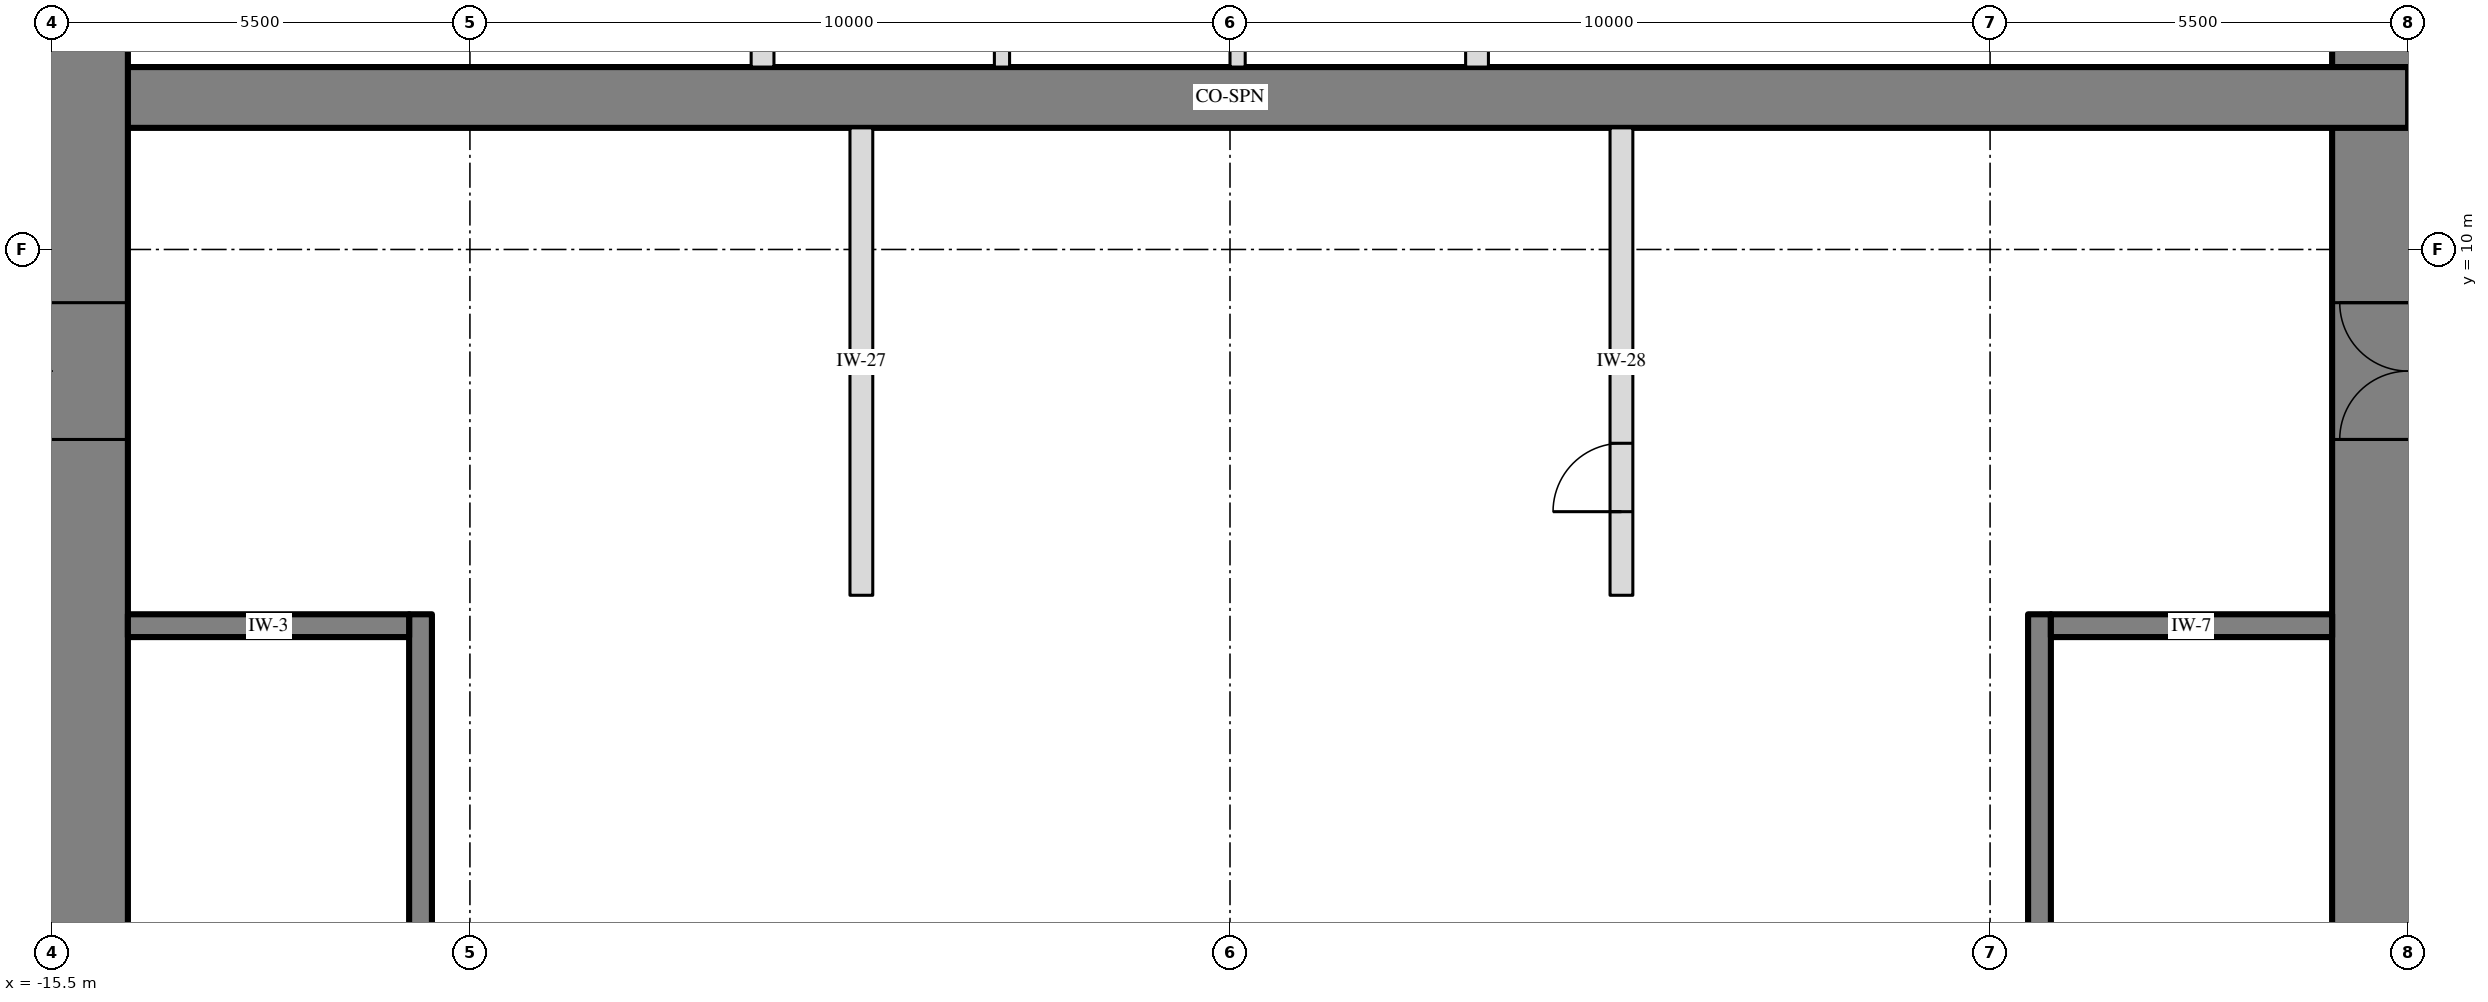
"""IFC4 building model, lengths in metres.
Left out: names, types, materials, properties, quantities, classifications, styles, units other than length and angle.
Written with IfcOpenShell. Run it as: python <this file> out.ifc"""

import sys

from ifc_helpers import new_model, si_unit, direction, frame, frame_2d, origin, origin_2d, place, context, subcontext, project, spatial, rectangle, extrude, element, fill, save


model = new_model("IFC4")
c1 = context("Model", 3, precision=1e-05, world=origin(), true_north=direction((0.0, 1.0)))
c2 = subcontext(c1, "Body", "Model", "MODEL_VIEW")
j1 = project(units=[si_unit("LENGTHUNIT", "METRE"), si_unit("PLANEANGLEUNIT", "RADIAN")], contexts=[c1])
p1 = place(None, origin())
s1 = spatial("IfcSite", under=j1, at=p1, CompositionType="ELEMENT")
p2 = place(p1, origin())
s2 = spatial("IfcBuilding", under=s1, at=p2, CompositionType="ELEMENT")
p3 = place(p2, frame((0.0, 0.0, -13.2)))
s3 = spatial("IfcBuildingStorey", under=s2, at=p3, CompositionType="ELEMENT", Elevation=-13.2)
p4 = place(p3, frame((15.5, -15.5, -0.4), z_axis=(0.0, 0.0, 1.0), x_axis=(0.0, 1.0, 0.0)))
e1 = element("IfcWall", 1, at=p4, inside=s3, PredefinedType="SHEAR", context=c2, shape_type="SweptSolid", body=[
    extrude(rectangle(XDim=31.0, YDim=2.0, at=frame_2d((15.5, 0.0))), origin(), (0.0, 0.0, 1.0), 4.3),
])
p5 = place(p4, frame((6.5, 0.0, 0.4)))
e2 = element("IfcOpeningElement", 2, at=p5, cuts=e1, PredefinedType="OPENING", context=c2, shape_type="SweptSolid", body=[
    extrude(rectangle(XDim=1.2, YDim=2.1, at=frame_2d((0.6, 1.05))), frame((0.0, 1.01, 0.0), z_axis=(0.0, -1.0, 0.0), x_axis=(1.0, 0.0, 0.0)), (0.0, 0.0, 1.0), 2.02),
])
p6 = place(p4, frame((23.0, 0.0, 0.4)))
e3 = element("IfcOpeningElement", 3, at=p6, cuts=e1, PredefinedType="OPENING", context=c2, shape_type="SweptSolid", body=[
    extrude(rectangle(XDim=1.8, YDim=2.1, at=frame_2d((0.9, 1.05))), frame((0.0, 1.01, 0.0), z_axis=(0.0, -1.0, 0.0), x_axis=(1.0, 0.0, 0.0)), (0.0, 0.0, 1.0), 2.02),
])
p7 = place(p3, frame((-15.5, 12.0, -0.4), z_axis=(0.0, 0.0, 1.0), x_axis=(1.0, 0.0, 0.0)))
e4 = element("IfcWall", 4, at=p7, inside=s3, PredefinedType="SHEAR", context=c2, shape_type="SweptSolid", body=[
    extrude(rectangle(XDim=31.0, YDim=0.8, at=frame_2d((15.5, 0.0))), origin(), (0.0, 0.0, 1.0), 4.3),
])
p8 = place(p3, frame((-15.5, -15.5, -0.4), z_axis=(0.0, 0.0, 1.0), x_axis=(0.0, 1.0, 0.0)))
e5 = element("IfcWall", 5, at=p8, inside=s3, PredefinedType="SHEAR", context=c2, shape_type="SweptSolid", body=[
    extrude(rectangle(XDim=31.0, YDim=2.0, at=frame_2d((15.5, 0.0))), origin(), (0.0, 0.0, 1.0), 4.3),
])
p9 = place(p8, frame((6.5, 0.0, 0.4)))
e6 = element("IfcOpeningElement", 6, at=p9, cuts=e5, PredefinedType="OPENING", context=c2, shape_type="SweptSolid", body=[
    extrude(rectangle(XDim=1.2, YDim=2.1, at=frame_2d((0.6, 1.05))), frame((0.0, 1.01, 0.0), z_axis=(0.0, -1.0, 0.0), x_axis=(1.0, 0.0, 0.0)), (0.0, 0.0, 1.0), 2.02),
])
p10 = place(p8, frame((23.0, 0.0, 0.4)))
e7 = element("IfcOpeningElement", 7, at=p10, cuts=e5, PredefinedType="OPENING", context=c2, shape_type="SweptSolid", body=[
    extrude(rectangle(XDim=1.8, YDim=2.1, at=frame_2d((0.9, 1.05))), frame((0.0, 1.01, 0.0), z_axis=(0.0, -1.0, 0.0), x_axis=(1.0, 0.0, 0.0)), (0.0, 0.0, 1.0), 2.02),
])
p11 = place(p3, frame((-10.65, -4.9, 0.0), z_axis=(0.0, 0.0, 1.0), x_axis=(0.0, 1.0, 0.0)))
e8 = element("IfcWall", 8, at=p11, inside=s3, PredefinedType="SOLIDWALL", context=c2, shape_type="SweptSolid", body=[
    extrude(rectangle(XDim=10.1, YDim=0.3, at=frame_2d((5.05, 0.0))), origin(), (0.0, 0.0, 1.0), 3.9),
])
p12 = place(p3, frame((-14.5, 5.05, 0.0), z_axis=(0.0, 0.0, 1.0), x_axis=(1.0, 0.0, 0.0)))
e9 = element("IfcWall", 9, at=p12, inside=s3, PredefinedType="SOLIDWALL", context=c2, shape_type="SweptSolid", body=[
    extrude(rectangle(XDim=3.7, YDim=0.3, at=frame_2d((1.85, 0.0))), origin(), (0.0, 0.0, 1.0), 3.9),
])
p13 = place(p3, frame((10.65, -4.9, 0.0), z_axis=(0.0, 0.0, 1.0), x_axis=(0.0, 1.0, 0.0)))
e10 = element("IfcWall", 10, at=p13, inside=s3, PredefinedType="SOLIDWALL", context=c2, shape_type="SweptSolid", body=[
    extrude(rectangle(XDim=10.1, YDim=0.3, at=frame_2d((5.05, 0.0))), origin(), (0.0, 0.0, 1.0), 3.9),
])
p14 = place(p3, frame((14.5, 5.05, 0.0), z_axis=(0.0, 0.0, 1.0), x_axis=(-1.0, 0.0, 0.0)))
e11 = element("IfcWall", 11, at=p14, inside=s3, PredefinedType="SOLIDWALL", context=c2, shape_type="SweptSolid", body=[
    extrude(rectangle(XDim=3.7, YDim=0.3, at=frame_2d((1.85, 0.0))), origin(), (0.0, 0.0, 1.0), 3.9),
])
for number, where, z_axis, x_axis in (
    (12, (-6.15, 12.4, 0.0), (0.0, 0.0, 1.0), (0.0, 1.0, 0.0)),
    (13, (3.25, 12.4, 0.0), (0.0, 0.0, 1.0), (0.0, 1.0, 0.0)),
):
    element("IfcWall", number, at=place(p3, frame(where, z_axis=z_axis, x_axis=x_axis)), inside=s3, PredefinedType="PARTITIONING", context=c2, shape_type="SweptSolid", body=[
        extrude(rectangle(XDim=2.1, YDim=0.3, at=frame_2d((1.05, 0.0))), origin(), (0.0, 0.0, 1.0), 3.9),
    ])
for number, where, z_axis, x_axis in (
    (14, (-3.0, 12.4, 0.0), (0.0, 0.0, 1.0), (0.0, 1.0, 0.0)),
    (15, (0.1, 12.4, 0.0), (0.0, 0.0, 1.0), (0.0, 1.0, 0.0)),
):
    element("IfcWall", number, at=place(p3, frame(where, z_axis=z_axis, x_axis=x_axis)), inside=s3, PredefinedType="PARTITIONING", context=c2, shape_type="SweptSolid", body=[
        extrude(rectangle(XDim=2.1, YDim=0.2, at=frame_2d((1.05, 0.0))), origin(), (0.0, 0.0, 1.0), 3.9),
    ])
p15 = place(p3, frame((-10.65, 2.0, 0.0), z_axis=(0.0, 0.0, 1.0), x_axis=(1.0, 0.0, 0.0)))
e16 = element("IfcWall", 16, at=p15, inside=s3, PredefinedType="PARTITIONING", context=c2, shape_type="SweptSolid", body=[
    extrude(rectangle(XDim=21.3, YDim=0.3, at=frame_2d((10.65, 0.0))), origin(), (0.0, 0.0, 1.0), 3.9),
])
p16 = place(p15, frame((10.05, 0.0, 0.0)))
e17 = element("IfcOpeningElement", 17, at=p16, cuts=e16, PredefinedType="OPENING", context=c2, shape_type="SweptSolid", body=[
    extrude(rectangle(XDim=1.2, YDim=2.1, at=frame_2d((0.6, 1.05))), frame((0.0, 0.16, 0.0), z_axis=(0.0, -1.0, 0.0), x_axis=(1.0, 0.0, 0.0)), (0.0, 0.0, 1.0), 0.32),
])
p17 = place(p15, frame((18.942, 0.0, 0.0)))
e18 = element("IfcOpeningElement", 18, at=p17, cuts=e16, PredefinedType="OPENING", context=c2, shape_type="SweptSolid", body=[
    extrude(rectangle(XDim=0.9, YDim=2.1, at=frame_2d((0.45, 1.05))), frame((0.0, 0.16, 0.0), z_axis=(0.0, -1.0, 0.0), x_axis=(1.0, 0.0, 0.0)), (0.0, 0.0, 1.0), 0.32),
])
p18 = place(p3, frame((-3.3, -6.65, 0.0), z_axis=(0.0, 0.0, 1.0), x_axis=(0.0, 1.0, 0.0)))
e19 = element("IfcWall", 19, at=p18, inside=s3, PredefinedType="PARTITIONING", context=c2, shape_type="SweptSolid", body=[
    extrude(rectangle(XDim=8.65, YDim=0.3, at=frame_2d((4.325, 0.0))), origin(), (0.0, 0.0, 1.0), 3.9),
])
p19 = place(p18, frame((1.75, 0.0, 0.0)))
e20 = element("IfcOpeningElement", 20, at=p19, cuts=e19, PredefinedType="OPENING", context=c2, shape_type="SweptSolid", body=[
    extrude(rectangle(XDim=0.9, YDim=2.1, at=frame_2d((0.45, 1.05))), frame((0.0, 0.16, 0.0), z_axis=(0.0, -1.0, 0.0), x_axis=(1.0, 0.0, 0.0)), (0.0, 0.0, 1.0), 0.32),
])
p20 = place(p18, frame((6.075, 0.0, 0.0)))
e21 = element("IfcOpeningElement", 21, at=p20, cuts=e19, PredefinedType="OPENING", context=c2, shape_type="SweptSolid", body=[
    extrude(rectangle(XDim=0.9, YDim=2.1, at=frame_2d((0.45, 1.05))), frame((0.0, 0.16, 0.0), z_axis=(0.0, -1.0, 0.0), x_axis=(1.0, 0.0, 0.0)), (0.0, 0.0, 1.0), 0.32),
])
p21 = place(p3, frame((3.3, -6.65, 0.0), z_axis=(0.0, 0.0, 1.0), x_axis=(0.0, 1.0, 0.0)))
e22 = element("IfcWall", 22, at=p21, inside=s3, PredefinedType="PARTITIONING", context=c2, shape_type="SweptSolid", body=[
    extrude(rectangle(XDim=8.65, YDim=0.3, at=frame_2d((4.325, 0.0))), origin(), (0.0, 0.0, 1.0), 3.9),
])
p22 = place(p21, frame((3.875, 0.0, 0.0)))
e23 = element("IfcOpeningElement", 23, at=p22, cuts=e22, PredefinedType="OPENING", context=c2, shape_type="SweptSolid", body=[
    extrude(rectangle(XDim=0.9, YDim=2.1, at=frame_2d((0.45, 1.05))), frame((0.0, 0.16, 0.0), z_axis=(0.0, -1.0, 0.0), x_axis=(1.0, 0.0, 0.0)), (0.0, 0.0, 1.0), 0.32),
])
p23 = place(p3, frame((6.834, -6.65, 0.0), z_axis=(0.0, 0.0, 1.0), x_axis=(0.0, 1.0, 0.0)))
e24 = element("IfcWall", 24, at=p23, inside=s3, PredefinedType="PARTITIONING", context=c2, shape_type="SweptSolid", body=[
    extrude(rectangle(XDim=8.65, YDim=0.3, at=frame_2d((4.325, 0.0))), origin(), (0.0, 0.0, 1.0), 3.9),
])
p24 = place(p3, frame((-4.85, 5.45, 0.0), z_axis=(0.0, 0.0, 1.0), x_axis=(1.0, 0.0, 0.0)))
e25 = element("IfcWall", 25, at=p24, inside=s3, PredefinedType="PARTITIONING", context=c2, shape_type="SweptSolid", body=[
    extrude(rectangle(XDim=10.0, YDim=0.3, at=frame_2d((5.0, 0.0))), origin(), (0.0, 0.0, 1.0), 3.9),
])
p25 = place(p3, frame((-4.85, 5.45, 0.0), z_axis=(0.0, 0.0, 1.0), x_axis=(0.0, 1.0, 0.0)))
e26 = element("IfcWall", 26, at=p25, inside=s3, PredefinedType="PARTITIONING", context=c2, shape_type="SweptSolid", body=[
    extrude(rectangle(XDim=6.15, YDim=0.3, at=frame_2d((3.075, 0.0))), origin(), (0.0, 0.0, 1.0), 3.9),
])
p26 = place(p3, frame((5.15, 5.45, 0.0), z_axis=(0.0, 0.0, 1.0), x_axis=(0.0, 1.0, 0.0)))
e27 = element("IfcWall", 27, at=p26, inside=s3, PredefinedType="PARTITIONING", context=c2, shape_type="SweptSolid", body=[
    extrude(rectangle(XDim=6.15, YDim=0.3, at=frame_2d((3.075, 0.0))), origin(), (0.0, 0.0, 1.0), 3.9),
])
p27 = place(p26, frame((1.1, 0.0, 0.0)))
e28 = element("IfcOpeningElement", 28, at=p27, cuts=e27, PredefinedType="OPENING", context=c2, shape_type="SweptSolid", body=[
    extrude(rectangle(XDim=0.9, YDim=2.1, at=frame_2d((0.45, 1.05))), frame((0.0, 0.16, 0.0), z_axis=(0.0, -1.0, 0.0), x_axis=(1.0, 0.0, 0.0)), (0.0, 0.0, 1.0), 0.32),
])
for number, where, z_axis, x_axis in (
    (29, (-4.55, 5.45, 0.0), (0.0, 0.0, 1.0), (1.0, 0.0, 0.0)),
    (30, (4.85, 5.45, 0.0), (0.0, 0.0, 1.0), (1.0, 0.0, 0.0)),
    (31, (-4.55, 8.5, 0.0), (0.0, 0.0, 1.0), (1.0, 0.0, 0.0)),
    (32, (4.85, 8.5, 0.0), (0.0, 0.0, 1.0), (1.0, 0.0, 0.0)),
):
    element("IfcColumn", number, at=place(p3, frame(where, z_axis=z_axis, x_axis=x_axis)), inside=s3, PredefinedType="COLUMN", context=c2, shape_type="SweptSolid", body=[
        extrude(rectangle(XDim=0.4, YDim=0.4, at=origin_2d()), origin(), (0.0, 0.0, 1.0), 3.9),
    ])
p28 = place(p3, frame((-6.0, 12.5, -1.8), z_axis=(0.0, 0.0, 1.0), x_axis=(1.0, 0.0, 0.0)))
e33 = element("IfcWall", 33, at=p28, inside=s3, PredefinedType="SOLIDWALL", context=c2, shape_type="SweptSolid", body=[
    extrude(rectangle(XDim=2.9, YDim=0.1, at=frame_2d((1.45, 0.0))), origin(), (0.0, 0.0, 1.0), 1.8),
])
for number, where, z_axis, x_axis in (
    (34, (-5.95, 14.35, -1.8), (0.0, 0.0, 1.0), (0.0, -1.0, 0.0)),
    (35, (-3.15, 12.55, -1.8), (0.0, 0.0, 1.0), (0.0, 1.0, 0.0)),
):
    element("IfcWall", number, at=place(p3, frame(where, z_axis=z_axis, x_axis=x_axis)), inside=s3, PredefinedType="SOLIDWALL", context=c2, shape_type="SweptSolid", body=[
        extrude(rectangle(XDim=1.8, YDim=0.1, at=frame_2d((0.9, 0.0))), origin(), (0.0, 0.0, 1.0), 1.8),
    ])
p29 = place(p3, frame((-2.9, 12.5, -1.8), z_axis=(0.0, 0.0, 1.0), x_axis=(1.0, 0.0, 0.0)))
e36 = element("IfcWall", 36, at=p29, inside=s3, PredefinedType="SOLIDWALL", context=c2, shape_type="SweptSolid", body=[
    extrude(rectangle(XDim=2.9, YDim=0.1, at=frame_2d((1.45, 0.0))), origin(), (0.0, 0.0, 1.0), 1.8),
])
for number, where, z_axis, x_axis in (
    (37, (-2.85, 14.35, -1.8), (0.0, 0.0, 1.0), (0.0, -1.0, 0.0)),
    (38, (-0.05, 12.55, -1.8), (0.0, 0.0, 1.0), (0.0, 1.0, 0.0)),
):
    element("IfcWall", number, at=place(p3, frame(where, z_axis=z_axis, x_axis=x_axis)), inside=s3, PredefinedType="SOLIDWALL", context=c2, shape_type="SweptSolid", body=[
        extrude(rectangle(XDim=1.8, YDim=0.1, at=frame_2d((0.9, 0.0))), origin(), (0.0, 0.0, 1.0), 1.8),
    ])
p30 = place(p3, frame((0.2, 12.5, -1.8), z_axis=(0.0, 0.0, 1.0), x_axis=(1.0, 0.0, 0.0)))
e39 = element("IfcWall", 39, at=p30, inside=s3, PredefinedType="SOLIDWALL", context=c2, shape_type="SweptSolid", body=[
    extrude(rectangle(XDim=2.9, YDim=0.1, at=frame_2d((1.45, 0.0))), origin(), (0.0, 0.0, 1.0), 1.8),
])
for number, where, z_axis, x_axis in (
    (40, (0.25, 14.35, -1.8), (0.0, 0.0, 1.0), (0.0, -1.0, 0.0)),
    (41, (3.05, 12.55, -1.8), (0.0, 0.0, 1.0), (0.0, 1.0, 0.0)),
):
    element("IfcWall", number, at=place(p3, frame(where, z_axis=z_axis, x_axis=x_axis)), inside=s3, PredefinedType="SOLIDWALL", context=c2, shape_type="SweptSolid", body=[
        extrude(rectangle(XDim=1.8, YDim=0.1, at=frame_2d((0.9, 0.0))), origin(), (0.0, 0.0, 1.0), 1.8),
    ])
p31 = place(p10, origin())
e42 = element("IfcDoor", 42, at=p31, inside=s3, OperationType="DOUBLE_DOOR_SINGLE_SWING", PredefinedType="DOOR", context=c2, shape_type="SweptSolid", body=[
    extrude(rectangle(XDim=1.8, YDim=2.1, at=frame_2d((0.9, 1.05))), frame((0.0, 0.025, 0.0), z_axis=(0.0, -1.0, 0.0), x_axis=(1.0, 0.0, 0.0)), (0.0, 0.0, 1.0), 0.05),
])
fill(e7, e42)
p32 = place(p6, origin())
e43 = element("IfcDoor", 43, at=p32, inside=s3, OperationType="DOUBLE_DOOR_SINGLE_SWING", PredefinedType="DOOR", context=c2, shape_type="SweptSolid", body=[
    extrude(rectangle(XDim=1.8, YDim=2.1, at=frame_2d((0.9, 1.05))), frame((0.0, 0.025, 0.0), z_axis=(0.0, -1.0, 0.0), x_axis=(1.0, 0.0, 0.0)), (0.0, 0.0, 1.0), 0.05),
])
fill(e3, e43)
p33 = place(p16, origin())
e44 = element("IfcDoor", 44, at=p33, inside=s3, OperationType="SINGLE_SWING_LEFT", PredefinedType="DOOR", context=c2, shape_type="SweptSolid", body=[
    extrude(rectangle(XDim=1.2, YDim=2.1, at=frame_2d((0.6, 1.05))), frame((0.0, 0.025, 0.0), z_axis=(0.0, -1.0, 0.0), x_axis=(1.0, 0.0, 0.0)), (0.0, 0.0, 1.0), 0.05),
])
fill(e17, e44)
p34 = place(p17, origin())
e45 = element("IfcDoor", 45, at=p34, inside=s3, OperationType="SINGLE_SWING_RIGHT", PredefinedType="DOOR", context=c2, shape_type="SweptSolid", body=[
    extrude(rectangle(XDim=0.9, YDim=2.1, at=frame_2d((0.45, 1.05))), frame((0.0, 0.025, 0.0), z_axis=(0.0, -1.0, 0.0), x_axis=(1.0, 0.0, 0.0)), (0.0, 0.0, 1.0), 0.05),
])
fill(e18, e45)
p35 = place(p27, origin())
e46 = element("IfcDoor", 46, at=p35, inside=s3, OperationType="SINGLE_SWING_LEFT", PredefinedType="DOOR", context=c2, shape_type="SweptSolid", body=[
    extrude(rectangle(XDim=0.9, YDim=2.1, at=frame_2d((0.45, 1.05))), frame((0.0, 0.025, 0.0), z_axis=(0.0, -1.0, 0.0), x_axis=(1.0, 0.0, 0.0)), (0.0, 0.0, 1.0), 0.05),
])
fill(e28, e46)
save(model, sys.argv[1])
